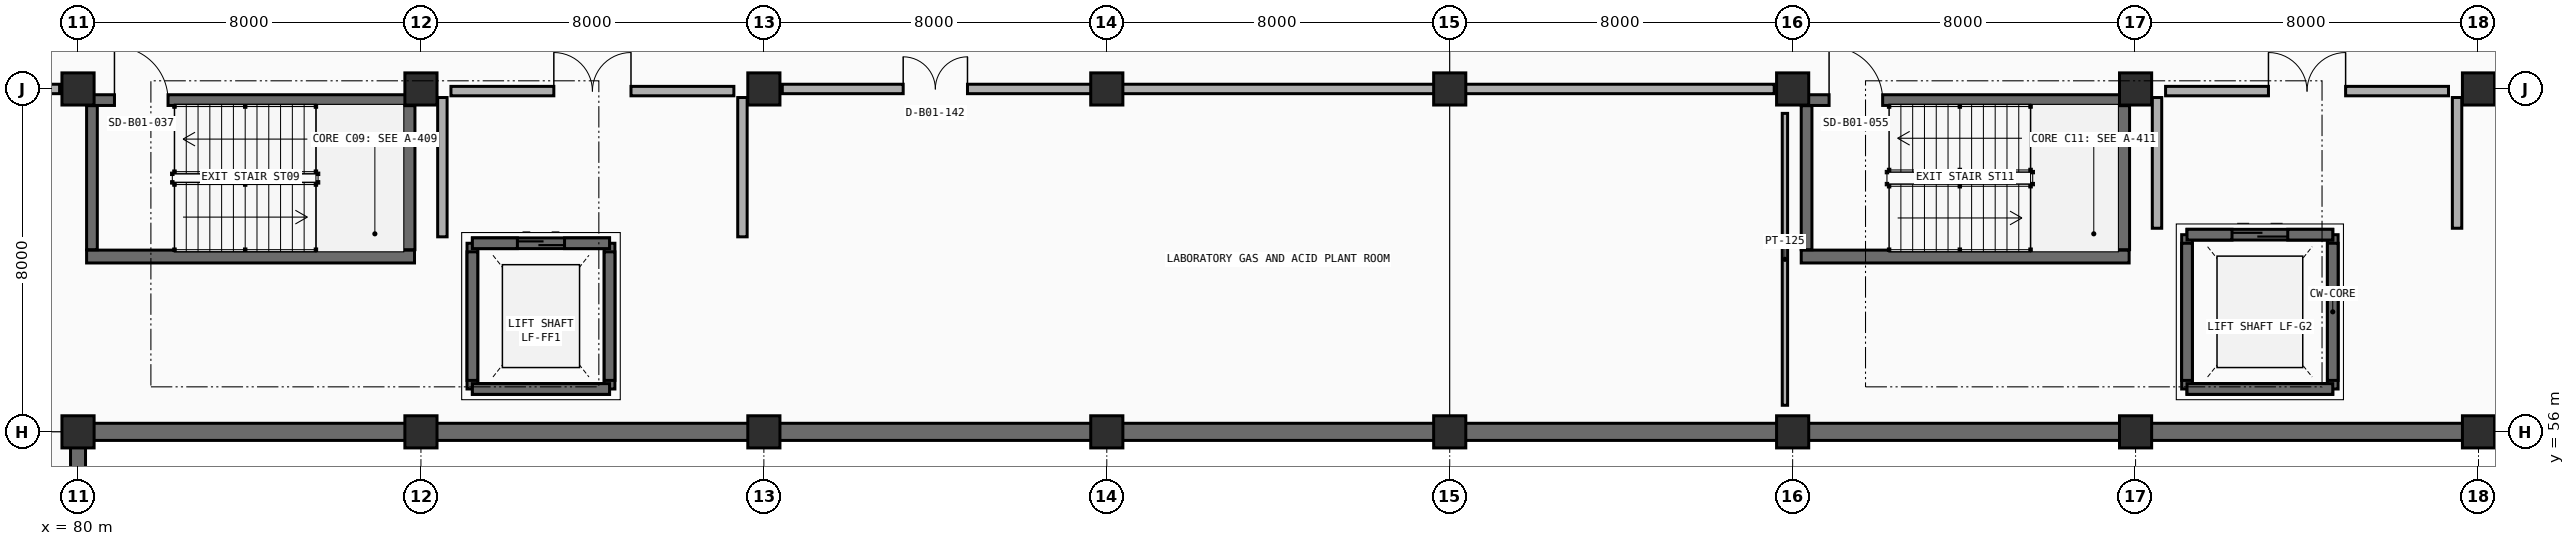
"""IFC4 building model, lengths in metres.
Left out: names, types, materials, properties, quantities, classifications, styles, units other than length and angle.
Written with IfcOpenShell. Run it as: python <this file> out.ifc"""

import sys

from ifc_helpers import new_model, si_unit, direction, frame, frame_2d, origin, origin_2d, place, context, subcontext, project, spatial, rectangle, extrude, element, fill, save


model = new_model("IFC4")
c1 = context("Model", 3, precision=1e-05, world=origin(), true_north=direction((0.0, 1.0)))
c2 = subcontext(c1, "Body", "Model", "MODEL_VIEW")
j1 = project(units=[si_unit("LENGTHUNIT", "METRE"), si_unit("PLANEANGLEUNIT", "RADIAN")], contexts=[c1])
p1 = place(None, origin())
s1 = spatial("IfcSite", under=j1, at=p1, CompositionType="ELEMENT")
p2 = place(p1, origin())
s2 = spatial("IfcBuilding", under=s1, at=p2, CompositionType="ELEMENT")
p3 = place(p2, frame((0.0, 0.0, -4.5)))
s3 = spatial("IfcBuildingStorey", under=s2, at=p3, CompositionType="ELEMENT", Elevation=-4.5)
for number, where, z_axis, x_axis in (
    (1, (80.0, 56.0, -0.405), (0.0, 0.0, 1.0), (1.0, 0.0, 0.0)),
    (2, (88.0, 56.0, -0.405), (0.0, 0.0, 1.0), (1.0, 0.0, 0.0)),
    (3, (96.0, 56.0, -0.405), (0.0, 0.0, 1.0), (1.0, 0.0, 0.0)),
    (4, (104.0, 56.0, -0.405), (0.0, 0.0, 1.0), (1.0, 0.0, 0.0)),
    (5, (112.0, 56.0, -0.405), (0.0, 0.0, 1.0), (1.0, 0.0, 0.0)),
    (6, (120.0, 56.0, -0.405), (0.0, 0.0, 1.0), (1.0, 0.0, 0.0)),
    (7, (128.0, 56.0, -0.405), (0.0, 0.0, 1.0), (1.0, 0.0, 0.0)),
    (8, (136.0, 56.0, -0.405), (0.0, 0.0, 1.0), (1.0, 0.0, 0.0)),
    (9, (80.0, 64.0, -0.405), (0.0, 0.0, 1.0), (1.0, 0.0, 0.0)),
    (10, (88.0, 64.0, -0.405), (0.0, 0.0, 1.0), (1.0, 0.0, 0.0)),
    (11, (96.0, 64.0, -0.405), (0.0, 0.0, 1.0), (1.0, 0.0, 0.0)),
    (12, (104.0, 64.0, -0.405), (0.0, 0.0, 1.0), (1.0, 0.0, 0.0)),
    (13, (112.0, 64.0, -0.405), (0.0, 0.0, 1.0), (1.0, 0.0, 0.0)),
    (14, (120.0, 64.0, -0.405), (0.0, 0.0, 1.0), (1.0, 0.0, 0.0)),
    (15, (128.0, 64.0, -0.405), (0.0, 0.0, 1.0), (1.0, 0.0, 0.0)),
    (16, (136.0, 64.0, -0.405), (0.0, 0.0, 1.0), (1.0, 0.0, 0.0)),
):
    element("IfcColumn", number, at=place(p3, frame(where, z_axis=z_axis, x_axis=x_axis)), inside=s3, PredefinedType="COLUMN", context=c2, shape_type="SweptSolid", body=[
        extrude(rectangle(XDim=0.75, YDim=0.75, at=origin_2d()), origin(), (0.0, 0.0, 1.0), 4.905),
    ])
for number, where, z_axis, x_axis in (
    (17, (87.65, 56.0, 0.0), (0.0, 0.0, 1.0), (-1.0, 0.0, 0.0)),
    (18, (95.65, 56.0, 0.0), (0.0, 0.0, 1.0), (-1.0, 0.0, 0.0)),
    (19, (103.65, 56.0, 0.0), (0.0, 0.0, 1.0), (-1.0, 0.0, 0.0)),
    (20, (111.65, 56.0, 0.0), (0.0, 0.0, 1.0), (-1.0, 0.0, 0.0)),
    (21, (119.65, 56.0, 0.0), (0.0, 0.0, 1.0), (-1.0, 0.0, 0.0)),
    (22, (127.65, 56.0, 0.0), (0.0, 0.0, 1.0), (-1.0, 0.0, 0.0)),
    (23, (135.65, 56.0, 0.0), (0.0, 0.0, 1.0), (-1.0, 0.0, 0.0)),
    (24, (143.65, 56.0, 0.0), (0.0, 0.0, 1.0), (-1.0, 0.0, 0.0)),
):
    element("IfcWall", number, at=place(p3, frame(where, z_axis=z_axis, x_axis=x_axis)), inside=s3, PredefinedType="USERDEFINED", context=c2, shape_type="SweptSolid", body=[
        extrude(rectangle(XDim=7.3, YDim=0.4, at=frame_2d((3.65, 0.0))), origin(), (0.0, 0.0, 1.0), 4.095),
    ])
p4 = place(p3, frame((80.0, 55.65, 0.0), z_axis=(0.0, 0.0, 1.0), x_axis=(0.0, -1.0, 0.0)))
e25 = element("IfcWall", 25, at=p4, inside=s3, PredefinedType="USERDEFINED", context=c2, shape_type="SweptSolid", body=[
    extrude(rectangle(XDim=7.3, YDim=0.35, at=frame_2d((3.65, 0.0))), origin(), (0.0, 0.0, 1.0), 4.095),
])
p5 = place(p3, frame((80.2, 60.09, 0.0), z_axis=(0.0, 0.0, 1.0), x_axis=(1.0, 0.0, 0.0)))
e26 = element("IfcWall", 26, at=p5, inside=s3, PredefinedType="SHEAR", context=c2, shape_type="SweptSolid", body=[
    extrude(rectangle(XDim=7.65, YDim=0.3, at=frame_2d((3.825, 0.0))), origin(), (0.0, 0.0, 1.0), 4.5),
])
p6 = place(p3, frame((87.71, 60.25, 0.0), z_axis=(0.0, 0.0, 1.0), x_axis=(0.0, 1.0, 0.0)))
e27 = element("IfcWall", 27, at=p6, inside=s3, PredefinedType="SHEAR", context=c2, shape_type="SweptSolid", body=[
    extrude(rectangle(XDim=3.36, YDim=0.3, at=frame_2d((1.68, 0.0))), origin(), (0.0, 0.0, 1.0), 4.5),
])
p7 = place(p3, frame((80.2, 63.74, 0.0), z_axis=(0.0, 0.0, 1.0), x_axis=(1.0, 0.0, 0.0)))
e28 = element("IfcWall", 28, at=p7, inside=s3, PredefinedType="SOLIDWALL", context=c2, shape_type="SweptSolid", body=[
    extrude(rectangle(XDim=7.65, YDim=0.25, at=frame_2d((3.825, 0.0))), origin(), (0.0, 0.0, 1.0), 4.5),
])
p8 = place(p7, frame((0.65, 0.0, 0.0)))
e29 = element("IfcOpeningElement", 29, at=p8, cuts=e28, PredefinedType="OPENING", context=c2, shape_type="SweptSolid", body=[
    extrude(rectangle(XDim=1.25, YDim=2.15, at=frame_2d((0.625, 1.075))), frame((0.0, 0.135, 0.0), z_axis=(0.0, -1.0, 0.0), x_axis=(1.0, 0.0, 0.0)), (0.0, 0.0, 1.0), 0.27),
])
p9 = place(p3, frame((80.325, 60.25, 0.0), z_axis=(0.0, 0.0, 1.0), x_axis=(0.0, 1.0, 0.0)))
e30 = element("IfcWall", 30, at=p9, inside=s3, PredefinedType="SOLIDWALL", context=c2, shape_type="SweptSolid", body=[
    extrude(rectangle(XDim=3.36, YDim=0.25, at=frame_2d((1.68, 0.0))), origin(), (0.0, 0.0, 1.0), 4.5),
])
p10 = place(p3, frame((120.2, 60.09, 0.0), z_axis=(0.0, 0.0, 1.0), x_axis=(1.0, 0.0, 0.0)))
e31 = element("IfcWall", 31, at=p10, inside=s3, PredefinedType="SHEAR", context=c2, shape_type="SweptSolid", body=[
    extrude(rectangle(XDim=7.65, YDim=0.3, at=frame_2d((3.825, 0.0))), origin(), (0.0, 0.0, 1.0), 4.5),
])
p11 = place(p3, frame((127.71, 60.25, 0.0), z_axis=(0.0, 0.0, 1.0), x_axis=(0.0, 1.0, 0.0)))
e32 = element("IfcWall", 32, at=p11, inside=s3, PredefinedType="SHEAR", context=c2, shape_type="SweptSolid", body=[
    extrude(rectangle(XDim=3.36, YDim=0.3, at=frame_2d((1.68, 0.0))), origin(), (0.0, 0.0, 1.0), 4.5),
])
p12 = place(p3, frame((120.2, 63.74, 0.0), z_axis=(0.0, 0.0, 1.0), x_axis=(1.0, 0.0, 0.0)))
e33 = element("IfcWall", 33, at=p12, inside=s3, PredefinedType="SOLIDWALL", context=c2, shape_type="SweptSolid", body=[
    extrude(rectangle(XDim=7.65, YDim=0.25, at=frame_2d((3.825, 0.0))), origin(), (0.0, 0.0, 1.0), 4.5),
])
p13 = place(p12, frame((0.65, 0.0, 0.0)))
e34 = element("IfcOpeningElement", 34, at=p13, cuts=e33, PredefinedType="OPENING", context=c2, shape_type="SweptSolid", body=[
    extrude(rectangle(XDim=1.25, YDim=2.15, at=frame_2d((0.625, 1.075))), frame((0.0, 0.135, 0.0), z_axis=(0.0, -1.0, 0.0), x_axis=(1.0, 0.0, 0.0)), (0.0, 0.0, 1.0), 0.27),
])
p14 = place(p3, frame((120.325, 60.25, 0.0), z_axis=(0.0, 0.0, 1.0), x_axis=(0.0, 1.0, 0.0)))
e35 = element("IfcWall", 35, at=p14, inside=s3, PredefinedType="SOLIDWALL", context=c2, shape_type="SweptSolid", body=[
    extrude(rectangle(XDim=3.36, YDim=0.25, at=frame_2d((1.68, 0.0))), origin(), (0.0, 0.0, 1.0), 4.5),
])
p15 = place(p3, frame((89.2, 57.0, -1.5), z_axis=(0.0, 0.0, 1.0), x_axis=(1.0, 0.0, 0.0)))
e36 = element("IfcWall", 36, at=p15, inside=s3, PredefinedType="SOLIDWALL", context=c2, shape_type="SweptSolid", body=[
    extrude(rectangle(XDim=3.2, YDim=0.25, at=frame_2d((1.6, 0.0))), origin(), (0.0, 0.0, 1.0), 1.5),
])
p16 = place(p3, frame((92.4, 57.0, -1.5), z_axis=(0.0, 0.0, 1.0), x_axis=(0.0, 1.0, 0.0)))
e37 = element("IfcWall", 37, at=p16, inside=s3, PredefinedType="SOLIDWALL", context=c2, shape_type="SweptSolid", body=[
    extrude(rectangle(XDim=3.4, YDim=0.25, at=frame_2d((1.7, 0.0))), origin(), (0.0, 0.0, 1.0), 1.5),
])
p17 = place(p3, frame((92.4, 60.4, -1.5), z_axis=(0.0, 0.0, 1.0), x_axis=(-1.0, 0.0, 0.0)))
e38 = element("IfcWall", 38, at=p17, inside=s3, PredefinedType="SOLIDWALL", context=c2, shape_type="SweptSolid", body=[
    extrude(rectangle(XDim=3.2, YDim=0.25, at=frame_2d((1.6, 0.0))), origin(), (0.0, 0.0, 1.0), 1.5),
])
p18 = place(p3, frame((89.2, 60.4, -1.5), z_axis=(0.0, 0.0, 1.0), x_axis=(0.0, -1.0, 0.0)))
e39 = element("IfcWall", 39, at=p18, inside=s3, PredefinedType="SOLIDWALL", context=c2, shape_type="SweptSolid", body=[
    extrude(rectangle(XDim=3.4, YDim=0.25, at=frame_2d((1.7, 0.0))), origin(), (0.0, 0.0, 1.0), 1.5),
])
p19 = place(p3, frame((89.2, 57.0, 0.0), z_axis=(0.0, 0.0, 1.0), x_axis=(1.0, 0.0, 0.0)))
e40 = element("IfcWall", 40, at=p19, inside=s3, PredefinedType="SOLIDWALL", context=c2, shape_type="SweptSolid", body=[
    extrude(rectangle(XDim=3.2, YDim=0.25, at=frame_2d((1.6, 0.0))), origin(), (0.0, 0.0, 1.0), 4.5),
])
p20 = place(p3, frame((89.2, 60.4, 0.0), z_axis=(0.0, 0.0, 1.0), x_axis=(1.0, 0.0, 0.0)))
e41 = element("IfcWall", 41, at=p20, inside=s3, PredefinedType="SOLIDWALL", context=c2, shape_type="SweptSolid", body=[
    extrude(rectangle(XDim=3.2, YDim=0.25, at=frame_2d((1.6, 0.0))), origin(), (0.0, 0.0, 1.0), 4.5),
])
p21 = place(p20, frame((1.05, 0.0, 0.0)))
e42 = element("IfcOpeningElement", 42, at=p21, cuts=e41, PredefinedType="OPENING", context=c2, shape_type="SweptSolid", body=[
    extrude(rectangle(XDim=1.1, YDim=2.15, at=frame_2d((0.55, 1.075))), frame((0.0, 0.135, 0.0), z_axis=(0.0, -1.0, 0.0), x_axis=(1.0, 0.0, 0.0)), (0.0, 0.0, 1.0), 0.27),
])
for number, where, z_axis, x_axis in (
    (43, (89.2, 57.2, 0.0), (0.0, 0.0, 1.0), (0.0, 1.0, 0.0)),
    (44, (92.4, 57.2, 0.0), (0.0, 0.0, 1.0), (0.0, 1.0, 0.0)),
):
    element("IfcWall", number, at=place(p3, frame(where, z_axis=z_axis, x_axis=x_axis)), inside=s3, PredefinedType="SOLIDWALL", context=c2, shape_type="SweptSolid", body=[
        extrude(rectangle(XDim=3.0, YDim=0.25, at=frame_2d((1.5, 0.0))), origin(), (0.0, 0.0, 1.0), 4.5),
    ])
p22 = place(p3, frame((88.7, 63.95, 0.0), z_axis=(0.0, 0.0, 1.0), x_axis=(1.0, 0.0, 0.0)))
e45 = element("IfcWall", 45, at=p22, inside=s3, PredefinedType="PARTITIONING", context=c2, shape_type="SweptSolid", body=[
    extrude(rectangle(XDim=6.6, YDim=0.22, at=frame_2d((3.3, 0.0))), origin(), (0.0, 0.0, 1.0), 3.37),
])
p23 = place(p22, frame((2.4, 0.0, 0.0)))
e46 = element("IfcOpeningElement", 46, at=p23, cuts=e45, PredefinedType="OPENING", context=c2, shape_type="SweptSolid", body=[
    extrude(rectangle(XDim=1.8, YDim=2.2, at=frame_2d((0.9, 1.1))), frame((0.0, 0.12, 0.0), z_axis=(0.0, -1.0, 0.0), x_axis=(1.0, 0.0, 0.0)), (0.0, 0.0, 1.0), 0.24),
])
for number, where, z_axis, x_axis in (
    (47, (88.5, 60.55, 0.0), (0.0, 0.0, 1.0), (0.0, 1.0, 0.0)),
    (48, (95.5, 60.55, 0.0), (0.0, 0.0, 1.0), (0.0, 1.0, 0.0)),
):
    element("IfcWall", number, at=place(p3, frame(where, z_axis=z_axis, x_axis=x_axis)), inside=s3, PredefinedType="PARTITIONING", context=c2, shape_type="SweptSolid", body=[
        extrude(rectangle(XDim=3.25, YDim=0.22, at=frame_2d((1.625, 0.0))), origin(), (0.0, 0.0, 1.0), 3.27),
    ])
p24 = place(p3, frame((129.2, 57.0, -1.5), z_axis=(0.0, 0.0, 1.0), x_axis=(1.0, 0.0, 0.0)))
e49 = element("IfcWall", 49, at=p24, inside=s3, PredefinedType="SOLIDWALL", context=c2, shape_type="SweptSolid", body=[
    extrude(rectangle(XDim=3.4, YDim=0.25, at=frame_2d((1.7, 0.0))), origin(), (0.0, 0.0, 1.0), 1.5),
])
p25 = place(p3, frame((132.6, 57.0, -1.5), z_axis=(0.0, 0.0, 1.0), x_axis=(0.0, 1.0, 0.0)))
e50 = element("IfcWall", 50, at=p25, inside=s3, PredefinedType="SOLIDWALL", context=c2, shape_type="SweptSolid", body=[
    extrude(rectangle(XDim=3.6, YDim=0.25, at=frame_2d((1.8, 0.0))), origin(), (0.0, 0.0, 1.0), 1.5),
])
p26 = place(p3, frame((132.6, 60.6, -1.5), z_axis=(0.0, 0.0, 1.0), x_axis=(-1.0, 0.0, 0.0)))
e51 = element("IfcWall", 51, at=p26, inside=s3, PredefinedType="SOLIDWALL", context=c2, shape_type="SweptSolid", body=[
    extrude(rectangle(XDim=3.4, YDim=0.25, at=frame_2d((1.7, 0.0))), origin(), (0.0, 0.0, 1.0), 1.5),
])
p27 = place(p3, frame((129.2, 60.6, -1.5), z_axis=(0.0, 0.0, 1.0), x_axis=(0.0, -1.0, 0.0)))
e52 = element("IfcWall", 52, at=p27, inside=s3, PredefinedType="SOLIDWALL", context=c2, shape_type="SweptSolid", body=[
    extrude(rectangle(XDim=3.6, YDim=0.25, at=frame_2d((1.8, 0.0))), origin(), (0.0, 0.0, 1.0), 1.5),
])
p28 = place(p3, frame((129.2, 57.0, 0.0), z_axis=(0.0, 0.0, 1.0), x_axis=(1.0, 0.0, 0.0)))
e53 = element("IfcWall", 53, at=p28, inside=s3, PredefinedType="SOLIDWALL", context=c2, shape_type="SweptSolid", body=[
    extrude(rectangle(XDim=3.4, YDim=0.25, at=frame_2d((1.7, 0.0))), origin(), (0.0, 0.0, 1.0), 4.5),
])
p29 = place(p3, frame((129.2, 60.6, 0.0), z_axis=(0.0, 0.0, 1.0), x_axis=(1.0, 0.0, 0.0)))
e54 = element("IfcWall", 54, at=p29, inside=s3, PredefinedType="SOLIDWALL", context=c2, shape_type="SweptSolid", body=[
    extrude(rectangle(XDim=3.4, YDim=0.25, at=frame_2d((1.7, 0.0))), origin(), (0.0, 0.0, 1.0), 4.5),
])
p30 = place(p29, frame((1.05, 0.0, 0.0)))
e55 = element("IfcOpeningElement", 55, at=p30, cuts=e54, PredefinedType="OPENING", context=c2, shape_type="SweptSolid", body=[
    extrude(rectangle(XDim=1.3, YDim=2.2, at=frame_2d((0.65, 1.1))), frame((0.0, 0.135, 0.0), z_axis=(0.0, -1.0, 0.0), x_axis=(1.0, 0.0, 0.0)), (0.0, 0.0, 1.0), 0.27),
])
for number, where, z_axis, x_axis in (
    (56, (129.2, 57.2, 0.0), (0.0, 0.0, 1.0), (0.0, 1.0, 0.0)),
    (57, (132.6, 57.2, 0.0), (0.0, 0.0, 1.0), (0.0, 1.0, 0.0)),
):
    element("IfcWall", number, at=place(p3, frame(where, z_axis=z_axis, x_axis=x_axis)), inside=s3, PredefinedType="SOLIDWALL", context=c2, shape_type="SweptSolid", body=[
        extrude(rectangle(XDim=3.2, YDim=0.25, at=frame_2d((1.6, 0.0))), origin(), (0.0, 0.0, 1.0), 4.5),
    ])
p31 = place(p3, frame((128.7, 63.95, 0.0), z_axis=(0.0, 0.0, 1.0), x_axis=(1.0, 0.0, 0.0)))
e58 = element("IfcWall", 58, at=p31, inside=s3, PredefinedType="PARTITIONING", context=c2, shape_type="SweptSolid", body=[
    extrude(rectangle(XDim=6.6, YDim=0.22, at=frame_2d((3.3, 0.0))), origin(), (0.0, 0.0, 1.0), 3.37),
])
p32 = place(p31, frame((2.4, 0.0, 0.0)))
e59 = element("IfcOpeningElement", 59, at=p32, cuts=e58, PredefinedType="OPENING", context=c2, shape_type="SweptSolid", body=[
    extrude(rectangle(XDim=1.8, YDim=2.2, at=frame_2d((0.9, 1.1))), frame((0.0, 0.12, 0.0), z_axis=(0.0, -1.0, 0.0), x_axis=(1.0, 0.0, 0.0)), (0.0, 0.0, 1.0), 0.24),
])
for number, where, z_axis, x_axis in (
    (60, (128.5, 60.75, 0.0), (0.0, 0.0, 1.0), (0.0, 1.0, 0.0)),
    (61, (135.5, 60.75, 0.0), (0.0, 0.0, 1.0), (0.0, 1.0, 0.0)),
):
    element("IfcWall", number, at=place(p3, frame(where, z_axis=z_axis, x_axis=x_axis)), inside=s3, PredefinedType="PARTITIONING", context=c2, shape_type="SweptSolid", body=[
        extrude(rectangle(XDim=3.05, YDim=0.22, at=frame_2d((1.525, 0.0))), origin(), (0.0, 0.0, 1.0), 3.27),
    ])
p33 = place(p3, frame((56.43, 64.0, 0.0), z_axis=(0.0, 0.0, 1.0), x_axis=(1.0, 0.0, 0.0)))
e62 = element("IfcWall", 62, at=p33, inside=s3, PredefinedType="PARTITIONING", context=c2, shape_type="SweptSolid", body=[
    extrude(rectangle(XDim=23.14, YDim=0.22, at=frame_2d((11.57, 0.0))), origin(), (0.0, 0.0, 1.0), 3.37),
])
p34 = place(p33, frame((2.82, 0.0, 0.0)))
e63 = element("IfcOpeningElement", 63, at=p34, cuts=e62, PredefinedType="OPENING", context=c2, shape_type="SweptSolid", body=[
    extrude(rectangle(XDim=1.5, YDim=2.2, at=frame_2d((0.75, 1.1))), frame((0.0, 0.12, 0.0), z_axis=(0.0, -1.0, 0.0), x_axis=(1.0, 0.0, 0.0)), (0.0, 0.0, 1.0), 0.24),
])
p35 = place(p3, frame((96.43, 64.0, 0.0), z_axis=(0.0, 0.0, 1.0), x_axis=(1.0, 0.0, 0.0)))
e64 = element("IfcWall", 64, at=p35, inside=s3, PredefinedType="PARTITIONING", context=c2, shape_type="SweptSolid", body=[
    extrude(rectangle(XDim=23.14, YDim=0.22, at=frame_2d((11.57, 0.0))), origin(), (0.0, 0.0, 1.0), 3.37),
])
p36 = place(p35, frame((2.82, 0.0, 0.0)))
e65 = element("IfcOpeningElement", 65, at=p36, cuts=e64, PredefinedType="OPENING", context=c2, shape_type="SweptSolid", body=[
    extrude(rectangle(XDim=1.5, YDim=2.2, at=frame_2d((0.75, 1.1))), frame((0.0, 0.12, 0.0), z_axis=(0.0, -1.0, 0.0), x_axis=(1.0, 0.0, 0.0)), (0.0, 0.0, 1.0), 0.24),
])
p37 = place(p3, frame((119.82, 56.62, 0.0), z_axis=(0.0, 0.0, 1.0), x_axis=(0.0, 1.0, 0.0)))
e66 = element("IfcWall", 66, at=p37, inside=s3, PredefinedType="PARTITIONING", context=c2, shape_type="SweptSolid", body=[
    extrude(rectangle(XDim=6.81, YDim=0.125, at=frame_2d((3.405, 0.0))), origin(), (0.0, 0.0, 1.0), 3.27),
])
p38 = place(p8, origin())
e67 = element("IfcDoor", 67, at=p38, inside=s3, OperationType="SINGLE_SWING_LEFT", PredefinedType="DOOR", context=c2, shape_type="SweptSolid", body=[
    extrude(rectangle(XDim=1.25, YDim=2.15, at=frame_2d((0.625, 1.075))), frame((0.0, 0.025, 0.0), z_axis=(0.0, -1.0, 0.0), x_axis=(1.0, 0.0, 0.0)), (0.0, 0.0, 1.0), 0.05),
])
fill(e29, e67)
p39 = place(p13, origin())
e68 = element("IfcDoor", 68, at=p39, inside=s3, OperationType="SINGLE_SWING_LEFT", PredefinedType="DOOR", context=c2, shape_type="SweptSolid", body=[
    extrude(rectangle(XDim=1.25, YDim=2.15, at=frame_2d((0.625, 1.075))), frame((0.0, 0.025, 0.0), z_axis=(0.0, -1.0, 0.0), x_axis=(1.0, 0.0, 0.0)), (0.0, 0.0, 1.0), 0.05),
])
fill(e34, e68)
p40 = place(p21, origin())
e69 = element("IfcDoor", 69, at=p40, inside=s3, OperationType="DOUBLE_DOOR_SLIDING", PredefinedType="DOOR", context=c2, shape_type="SweptSolid", body=[
    extrude(rectangle(XDim=1.1, YDim=2.15, at=frame_2d((0.55, 1.075))), frame((0.0, 0.025, 0.0), z_axis=(0.0, -1.0, 0.0), x_axis=(1.0, 0.0, 0.0)), (0.0, 0.0, 1.0), 0.05),
])
fill(e42, e69)
p41 = place(p23, origin())
e70 = element("IfcDoor", 70, at=p41, inside=s3, OperationType="DOUBLE_DOOR_SINGLE_SWING", PredefinedType="DOOR", context=c2, shape_type="SweptSolid", body=[
    extrude(rectangle(XDim=1.8, YDim=2.2, at=frame_2d((0.9, 1.1))), frame((0.0, 0.025, 0.0), z_axis=(0.0, -1.0, 0.0), x_axis=(1.0, 0.0, 0.0)), (0.0, 0.0, 1.0), 0.05),
])
fill(e46, e70)
p42 = place(p30, origin())
e71 = element("IfcDoor", 71, at=p42, inside=s3, OperationType="DOUBLE_DOOR_SLIDING", PredefinedType="DOOR", context=c2, shape_type="SweptSolid", body=[
    extrude(rectangle(XDim=1.3, YDim=2.2, at=frame_2d((0.65, 1.1))), frame((0.0, 0.025, 0.0), z_axis=(0.0, -1.0, 0.0), x_axis=(1.0, 0.0, 0.0)), (0.0, 0.0, 1.0), 0.05),
])
fill(e55, e71)
p43 = place(p32, origin())
e72 = element("IfcDoor", 72, at=p43, inside=s3, OperationType="DOUBLE_DOOR_SINGLE_SWING", PredefinedType="DOOR", context=c2, shape_type="SweptSolid", body=[
    extrude(rectangle(XDim=1.8, YDim=2.2, at=frame_2d((0.9, 1.1))), frame((0.0, 0.025, 0.0), z_axis=(0.0, -1.0, 0.0), x_axis=(1.0, 0.0, 0.0)), (0.0, 0.0, 1.0), 0.05),
])
fill(e59, e72)
p44 = place(p36, origin())
e73 = element("IfcDoor", 73, at=p44, inside=s3, OperationType="DOUBLE_DOOR_SINGLE_SWING", PredefinedType="DOOR", context=c2, shape_type="SweptSolid", body=[
    extrude(rectangle(XDim=1.5, YDim=2.2, at=frame_2d((0.75, 1.1))), frame((0.0, 0.025, 0.0), z_axis=(0.0, -1.0, 0.0), x_axis=(1.0, 0.0, 0.0)), (0.0, 0.0, 1.0), 0.05),
])
fill(e65, e73)
save(model, sys.argv[1])
